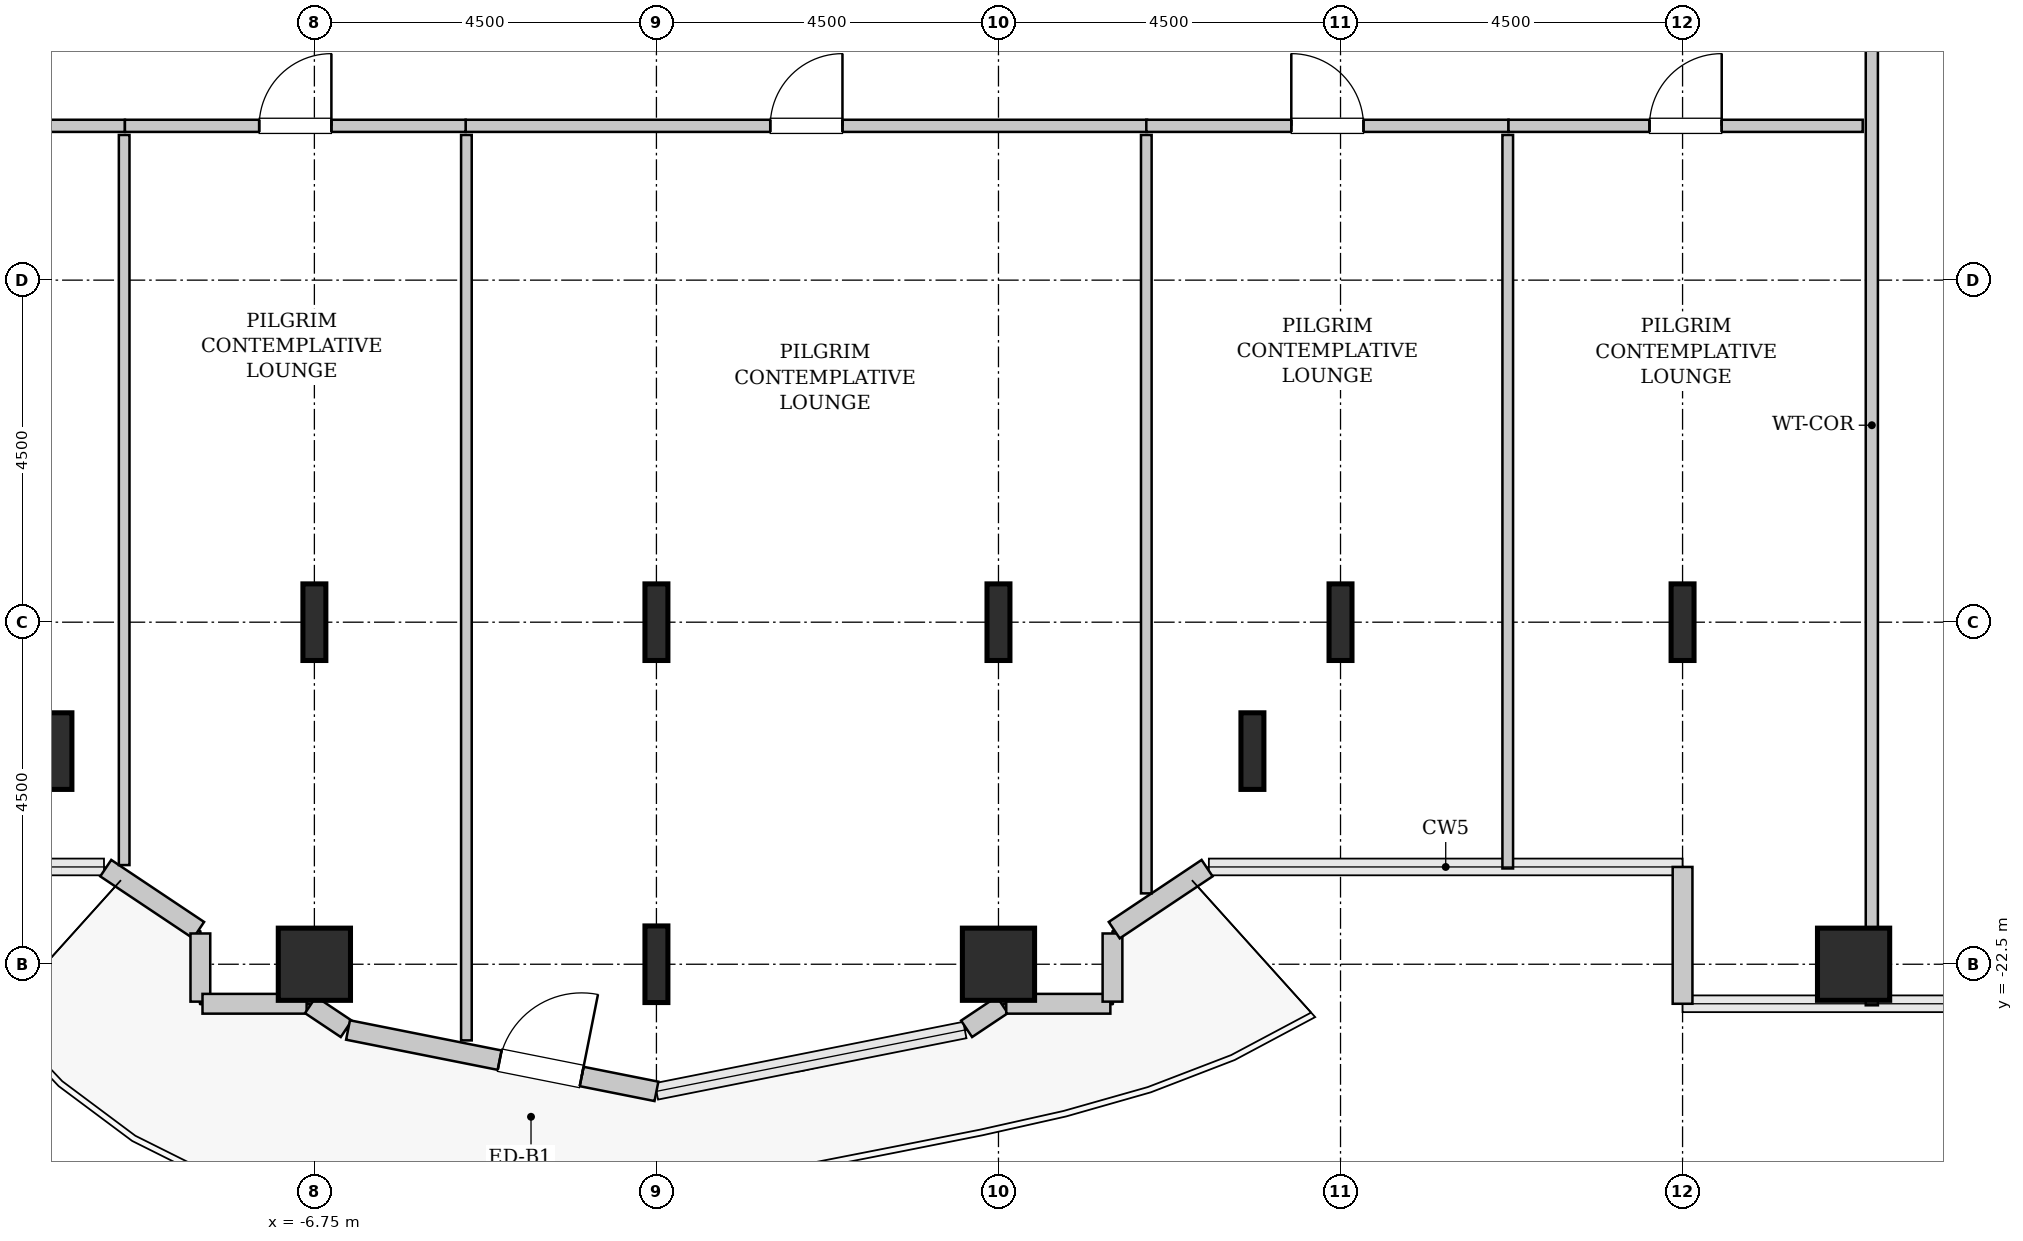
"""IFC4 building model, lengths in metres.
Left out: names, types, materials, properties, quantities, classifications, styles, units other than length and angle.
Written with IfcOpenShell. Run it as: python <this file> out.ifc"""

import sys

from ifc_helpers import new_model, si_unit, direction, frame, frame_2d, origin, origin_2d, place, context, subcontext, project, spatial, rectangle, hollow_rectangle, i_section, extrude, source, transform, mapped, element, fill, save


model = new_model("IFC4")
c1 = context("Model", 3, precision=1e-05, world=origin(), true_north=direction((0.0, 1.0)))
c2 = subcontext(c1, "Body", "Model", "MODEL_VIEW")
j1 = project(units=[si_unit("LENGTHUNIT", "METRE"), si_unit("PLANEANGLEUNIT", "RADIAN")], contexts=[c1])
p1 = place(None, origin())
s1 = spatial("IfcSite", under=j1, at=p1, CompositionType="ELEMENT")
p2 = place(p1, origin())
s2 = spatial("IfcBuilding", under=s1, at=p2, CompositionType="ELEMENT")
p3 = place(p2, frame((0.0, 0.0, 102.2)))
s3 = spatial("IfcBuildingStorey", under=s2, at=p3, CompositionType="ELEMENT", Elevation=102.2)
m1 = source(origin(), c2, "Body", "SweptSolid", [
    extrude(i_section(OverallWidth=0.302, OverallDepth=1.008, WebThickness=0.021, FlangeThickness=0.04, FilletRadius=0.03, at=origin_2d()), origin(), (0.0, 0.0, 1.0), 3.8),
])
p4 = place(p3, frame((-10.091, -19.696, 0.0), z_axis=(0.0, 0.0, 1.0), x_axis=(1.0, 0.0, 0.0)))
e1 = element("IfcColumn", 1, at=p4, inside=s3, PredefinedType="COLUMN", context=c2, shape_type="MappedRepresentation", body=[
    mapped(m1, transform((0.0, 0.0, 0.0), x_axis=(1.0, 0.0, 0.0), y_axis=(0.0, 1.0, 0.0), z_axis=(0.0, 0.0, 1.0), scale=1.0)),
])
m2 = source(origin(), c2, "Body", "SweptSolid", [
    extrude(hollow_rectangle(XDim=0.95, YDim=0.95, WallThickness=0.045, InnerFilletRadius=0.045, OuterFilletRadius=0.09, at=origin_2d()), origin(), (0.0, 0.0, 1.0), 3.8),
])
p5 = place(p3, frame((-6.75, -22.5, 0.0), z_axis=(0.0, 0.0, 1.0), x_axis=(1.0, 0.0, 0.0)))
e2 = element("IfcColumn", 2, at=p5, inside=s3, PredefinedType="COLUMN", context=c2, shape_type="MappedRepresentation", body=[
    mapped(m2, transform((0.0, 0.0, 0.0), x_axis=(1.0, 0.0, 0.0), y_axis=(0.0, 1.0, 0.0), z_axis=(0.0, 0.0, 1.0), scale=1.0)),
])
for number, where, z_axis, x_axis in (
    (3, (-6.75, -18.0, 0.0), (0.0, 0.0, 1.0), (1.0, 0.0, 0.0)),
    (4, (-2.25, -22.5, 0.0), (0.0, 0.0, 1.0), (1.0, 0.0, 0.0)),
    (5, (-2.25, -18.0, 0.0), (0.0, 0.0, 1.0), (1.0, 0.0, 0.0)),
):
    element("IfcColumn", number, at=place(p3, frame(where, z_axis=z_axis, x_axis=x_axis)), inside=s3, PredefinedType="COLUMN", context=c2, shape_type="MappedRepresentation", body=[
        mapped(m1, transform((0.0, 0.0, 0.0), x_axis=(1.0, 0.0, 0.0), y_axis=(0.0, 1.0, 0.0), z_axis=(0.0, 0.0, 1.0), scale=1.0)),
    ])
p6 = place(p3, frame((2.25, -22.5, 0.0), z_axis=(0.0, 0.0, 1.0), x_axis=(1.0, 0.0, 0.0)))
e6 = element("IfcColumn", 6, at=p6, inside=s3, PredefinedType="COLUMN", context=c2, shape_type="MappedRepresentation", body=[
    mapped(m2, transform((0.0, 0.0, 0.0), x_axis=(1.0, 0.0, 0.0), y_axis=(0.0, 1.0, 0.0), z_axis=(0.0, 0.0, 1.0), scale=1.0)),
])
for number, where, z_axis, x_axis in (
    (7, (2.25, -18.0, 0.0), (0.0, 0.0, 1.0), (1.0, 0.0, 0.0)),
    (8, (5.591, -19.696, 0.0), (0.0, 0.0, 1.0), (1.0, 0.0, 0.0)),
    (9, (6.75, -18.0, 0.0), (0.0, 0.0, 1.0), (1.0, 0.0, 0.0)),
    (10, (11.25, -18.0, 0.0), (0.0, 0.0, 1.0), (1.0, 0.0, 0.0)),
):
    element("IfcColumn", number, at=place(p3, frame(where, z_axis=z_axis, x_axis=x_axis)), inside=s3, PredefinedType="COLUMN", context=c2, shape_type="MappedRepresentation", body=[
        mapped(m1, transform((0.0, 0.0, 0.0), x_axis=(1.0, 0.0, 0.0), y_axis=(0.0, 1.0, 0.0), z_axis=(0.0, 0.0, 1.0), scale=1.0)),
    ])
p7 = place(p3, frame((13.5, -22.5, 0.0), z_axis=(0.0, 0.0, 1.0), x_axis=(1.0, 0.0, 0.0)))
e11 = element("IfcColumn", 11, at=p7, inside=s3, PredefinedType="COLUMN", context=c2, shape_type="MappedRepresentation", body=[
    mapped(m2, transform((0.0, 0.0, 0.0), x_axis=(1.0, 0.0, 0.0), y_axis=(0.0, 1.0, 0.0), z_axis=(0.0, 0.0, 1.0), scale=1.0)),
])
m3 = source(origin(), c2, "Body", "SweptSolid", [
    extrude(rectangle(XDim=1.8, YDim=0.26, at=frame_2d((0.9, 0.0))), origin(), (0.0, 0.0, 1.0), 3.55),
])
p8 = place(p3, frame((11.25, -21.22, 0.0), z_axis=(0.0, 0.0, 1.0), x_axis=(0.0, -1.0, 0.0)))
e12 = element("IfcWall", 12, at=p8, inside=s3, PredefinedType="SOLIDWALL", context=c2, shape_type="MappedRepresentation", body=[
    mapped(m3, transform((0.0, 0.0, 0.0), x_axis=(1.0, 0.0, 0.0), y_axis=(0.0, 1.0, 0.0), z_axis=(0.0, 0.0, 1.0), scale=1.0)),
])
m4 = source(origin(), c2, "Body", "SweptSolid", [
    extrude(rectangle(XDim=1.469, YDim=0.26, at=frame_2d((0.734, 0.0))), origin(), (0.0, 0.0, 1.0), 3.55),
])
p9 = place(p3, frame((-9.495, -21.236, 0.0), z_axis=(0.0, 0.0, 1.0), x_axis=(0.831461760506, -0.555581983884, 0.0)))
e13 = element("IfcWall", 13, at=p9, inside=s3, PredefinedType="SOLIDWALL", context=c2, shape_type="MappedRepresentation", body=[
    mapped(m4, transform((0.0, 0.0, 0.0), x_axis=(1.0, 0.0, 0.0), y_axis=(0.0, 1.0, 0.0), z_axis=(0.0, 0.0, 1.0), scale=1.0)),
])
m5 = source(origin(), c2, "Body", "SweptSolid", [
    extrude(rectangle(XDim=0.897, YDim=0.26, at=frame_2d((0.448, 0.0))), origin(), (0.0, 0.0, 1.0), 3.55),
])
p10 = place(p3, frame((-8.25, -22.095, 0.0), z_axis=(0.0, 0.0, 1.0), x_axis=(0.0, -1.0, 0.0)))
e14 = element("IfcWall", 14, at=p10, inside=s3, PredefinedType="SOLIDWALL", context=c2, shape_type="MappedRepresentation", body=[
    mapped(m5, transform((0.0, 0.0, 0.0), x_axis=(1.0, 0.0, 0.0), y_axis=(0.0, 1.0, 0.0), z_axis=(0.0, 0.0, 1.0), scale=1.0)),
])
m6 = source(origin(), c2, "Body", "SweptSolid", [
    extrude(rectangle(XDim=1.37, YDim=0.26, at=frame_2d((0.685, 0.0))), origin(), (0.0, 0.0, 1.0), 3.55),
])
p11 = place(p3, frame((-8.222, -23.02, 0.0), z_axis=(0.0, 0.0, 1.0), x_axis=(1.0, 0.0, 0.0)))
e15 = element("IfcWall", 15, at=p11, inside=s3, PredefinedType="SOLIDWALL", context=c2, shape_type="MappedRepresentation", body=[
    mapped(m6, transform((0.0, 0.0, 0.0), x_axis=(1.0, 0.0, 0.0), y_axis=(0.0, 1.0, 0.0), z_axis=(0.0, 0.0, 1.0), scale=1.0)),
])
m7 = source(origin(), c2, "Body", "SweptSolid", [
    extrude(rectangle(XDim=0.565, YDim=0.26, at=frame_2d((0.283, 0.0))), origin(), (0.0, 0.0, 1.0), 3.55),
])
p12 = place(p3, frame((-6.801, -23.036, 0.0), z_axis=(0.0, 0.0, 1.0), x_axis=(0.831651492666, -0.555297933317, 0.0)))
e16 = element("IfcWall", 16, at=p12, inside=s3, PredefinedType="SOLIDWALL", context=c2, shape_type="MappedRepresentation", body=[
    mapped(m7, transform((0.0, 0.0, 0.0), x_axis=(1.0, 0.0, 0.0), y_axis=(0.0, 1.0, 0.0), z_axis=(0.0, 0.0, 1.0), scale=1.0)),
])
m8 = source(origin(), c2, "Body", "SweptSolid", [
    extrude(rectangle(XDim=4.137, YDim=0.26, at=frame_2d((2.068, 0.0))), origin(), (0.0, 0.0, 1.0), 3.55),
])
p13 = place(p3, frame((-6.307, -23.365, 0.0), z_axis=(0.0, 0.0, 1.0), x_axis=(0.980782170794, -0.195105954428, 0.0)))
e17 = element("IfcWall", 17, at=p13, inside=s3, PredefinedType="SOLIDWALL", context=c2, shape_type="MappedRepresentation", body=[
    mapped(m8, transform((0.0, 0.0, 0.0), x_axis=(1.0, 0.0, 0.0), y_axis=(0.0, 1.0, 0.0), z_axis=(0.0, 0.0, 1.0), scale=1.0)),
])
p14 = place(p13, frame((2.034, 0.0, 0.0)))
e18 = element("IfcOpeningElement", 18, at=p14, cuts=e17, PredefinedType="OPENING", context=c2, shape_type="SweptSolid", body=[
    extrude(rectangle(XDim=1.1, YDim=2.2, at=frame_2d((0.55, 1.1))), frame((0.0, 0.14, 0.0), z_axis=(0.0, -1.0, 0.0), x_axis=(1.0, 0.0, 0.0)), (0.0, 0.0, 1.0), 0.28),
])
p15 = place(p3, frame((1.831, -23.35, 0.0), z_axis=(0.0, 0.0, 1.0), x_axis=(0.831651492666, 0.555297933317, 0.0)))
e19 = element("IfcWall", 19, at=p15, inside=s3, PredefinedType="SOLIDWALL", context=c2, shape_type="MappedRepresentation", body=[
    mapped(m7, transform((0.0, 0.0, 0.0), x_axis=(1.0, 0.0, 0.0), y_axis=(0.0, 1.0, 0.0), z_axis=(0.0, 0.0, 1.0), scale=1.0)),
])
p16 = place(p3, frame((2.352, -23.02, 0.0), z_axis=(0.0, 0.0, 1.0), x_axis=(1.0, 0.0, 0.0)))
e20 = element("IfcWall", 20, at=p16, inside=s3, PredefinedType="SOLIDWALL", context=c2, shape_type="MappedRepresentation", body=[
    mapped(m6, transform((0.0, 0.0, 0.0), x_axis=(1.0, 0.0, 0.0), y_axis=(0.0, 1.0, 0.0), z_axis=(0.0, 0.0, 1.0), scale=1.0)),
])
p17 = place(p3, frame((3.75, -22.992, 0.0), z_axis=(0.0, 0.0, 1.0), x_axis=(0.0, 1.0, 0.0)))
e21 = element("IfcWall", 21, at=p17, inside=s3, PredefinedType="SOLIDWALL", context=c2, shape_type="MappedRepresentation", body=[
    mapped(m5, transform((0.0, 0.0, 0.0), x_axis=(1.0, 0.0, 0.0), y_axis=(0.0, 1.0, 0.0), z_axis=(0.0, 0.0, 1.0), scale=1.0)),
])
p18 = place(p3, frame((3.773, -22.052, 0.0), z_axis=(0.0, 0.0, 1.0), x_axis=(0.831461760506, 0.555581983884, 0.0)))
e22 = element("IfcWall", 22, at=p18, inside=s3, PredefinedType="SOLIDWALL", context=c2, shape_type="MappedRepresentation", body=[
    mapped(m4, transform((0.0, 0.0, 0.0), x_axis=(1.0, 0.0, 0.0), y_axis=(0.0, 1.0, 0.0), z_axis=(0.0, 0.0, 1.0), scale=1.0)),
])
m9 = source(origin(), c2, "Body", "SweptSolid", [
    extrude(rectangle(XDim=19.845, YDim=0.16, at=frame_2d((9.922, 0.0))), origin(), (0.0, 0.0, 1.0), 3.535),
])
p19 = place(p3, frame((13.74, -23.04, 0.0), z_axis=(0.0, 0.0, 1.0), x_axis=(0.0, 1.0, 0.0)))
e23 = element("IfcWall", 23, at=p19, inside=s3, PredefinedType="PARTITIONING", context=c2, shape_type="MappedRepresentation", body=[
    mapped(m9, transform((0.0, 0.0, 0.0), x_axis=(1.0, 0.0, 0.0), y_axis=(0.0, 1.0, 0.0), z_axis=(0.0, 0.0, 1.0), scale=1.0)),
])
p20 = place(p19, frame((15.212, 0.0, 0.0)))
e24 = element("IfcOpeningElement", 24, at=p20, cuts=e23, PredefinedType="OPENING", context=c2, shape_type="SweptSolid", body=[
    extrude(rectangle(XDim=0.95, YDim=2.1, at=frame_2d((0.475, 1.05))), frame((0.0, 0.09, 0.0), z_axis=(0.0, -1.0, 0.0), x_axis=(1.0, 0.0, 0.0)), (0.0, 0.0, 1.0), 0.18),
])
m10 = source(origin(), c2, "Body", "SweptSolid", [
    extrude(rectangle(XDim=8.965, YDim=0.16, at=frame_2d((4.482, 0.0))), origin(), (0.0, 0.0, 1.0), 3.535),
])
p21 = place(p3, frame((-4.76, -11.47, 0.0), z_axis=(0.0, 0.0, 1.0), x_axis=(1.0, 0.0, 0.0)))
e25 = element("IfcWall", 25, at=p21, inside=s3, PredefinedType="PARTITIONING", context=c2, shape_type="MappedRepresentation", body=[
    mapped(m10, transform((0.0, 0.0, 0.0), x_axis=(1.0, 0.0, 0.0), y_axis=(0.0, 1.0, 0.0), z_axis=(0.0, 0.0, 1.0), scale=1.0)),
])
p22 = place(p21, frame((4.008, 0.0, 0.0)))
e26 = element("IfcOpeningElement", 26, at=p22, cuts=e25, PredefinedType="OPENING", context=c2, shape_type="SweptSolid", body=[
    extrude(rectangle(XDim=0.95, YDim=2.1, at=frame_2d((0.475, 1.05))), frame((0.0, 0.09, 0.0), z_axis=(0.0, -1.0, 0.0), x_axis=(1.0, 0.0, 0.0)), (0.0, 0.0, 1.0), 0.18),
])
m11 = source(origin(), c2, "Body", "SweptSolid", [
    extrude(rectangle(XDim=11.912, YDim=0.14, at=frame_2d((5.956, 0.0))), origin(), (0.0, 0.0, 1.0), 3.535),
])
p23 = place(p3, frame((-4.75, -23.502, 0.0), z_axis=(0.0, 0.0, 1.0), x_axis=(0.0, 1.0, 0.0)))
e27 = element("IfcWall", 27, at=p23, inside=s3, PredefinedType="PARTITIONING", context=c2, shape_type="MappedRepresentation", body=[
    mapped(m11, transform((0.0, 0.0, 0.0), x_axis=(1.0, 0.0, 0.0), y_axis=(0.0, 1.0, 0.0), z_axis=(0.0, 0.0, 1.0), scale=1.0)),
])
m12 = source(origin(), c2, "Body", "SweptSolid", [
    extrude(rectangle(XDim=9.978, YDim=0.14, at=frame_2d((4.989, 0.0))), origin(), (0.0, 0.0, 1.0), 3.535),
])
p24 = place(p3, frame((4.195, -21.568, 0.0), z_axis=(0.0, 0.0, 1.0), x_axis=(0.0, 1.0, 0.0)))
e28 = element("IfcWall", 28, at=p24, inside=s3, PredefinedType="PARTITIONING", context=c2, shape_type="MappedRepresentation", body=[
    mapped(m12, transform((0.0, 0.0, 0.0), x_axis=(1.0, 0.0, 0.0), y_axis=(0.0, 1.0, 0.0), z_axis=(0.0, 0.0, 1.0), scale=1.0)),
])
m13 = source(origin(), c2, "Body", "SweptSolid", [
    extrude(rectangle(XDim=4.378, YDim=0.16, at=frame_2d((2.189, 0.0))), origin(), (0.0, 0.0, 1.0), 3.535),
])
p25 = place(p3, frame((-13.62, -11.47, 0.0), z_axis=(0.0, 0.0, 1.0), x_axis=(1.0, 0.0, 0.0)))
e29 = element("IfcWall", 29, at=p25, inside=s3, PredefinedType="PARTITIONING", context=c2, shape_type="MappedRepresentation", body=[
    mapped(m13, transform((0.0, 0.0, 0.0), x_axis=(1.0, 0.0, 0.0), y_axis=(0.0, 1.0, 0.0), z_axis=(0.0, 0.0, 1.0), scale=1.0)),
])
p26 = place(p25, frame((1.714, 0.0, 0.0)))
e30 = element("IfcOpeningElement", 30, at=p26, cuts=e29, PredefinedType="OPENING", context=c2, shape_type="SweptSolid", body=[
    extrude(rectangle(XDim=0.95, YDim=2.1, at=frame_2d((0.475, 1.05))), frame((0.0, 0.09, 0.0), z_axis=(0.0, -1.0, 0.0), x_axis=(1.0, 0.0, 0.0)), (0.0, 0.0, 1.0), 0.18),
])
m14 = source(origin(), c2, "Body", "SweptSolid", [
    extrude(rectangle(XDim=9.605, YDim=0.14, at=frame_2d((4.803, 0.0))), origin(), (0.0, 0.0, 1.0), 3.535),
])
p27 = place(p3, frame((-9.252, -21.195, 0.0), z_axis=(0.0, 0.0, 1.0), x_axis=(0.0, 1.0, 0.0)))
e31 = element("IfcWall", 31, at=p27, inside=s3, PredefinedType="PARTITIONING", context=c2, shape_type="MappedRepresentation", body=[
    mapped(m14, transform((0.0, 0.0, 0.0), x_axis=(1.0, 0.0, 0.0), y_axis=(0.0, 1.0, 0.0), z_axis=(0.0, 0.0, 1.0), scale=1.0)),
])
m15 = source(origin(), c2, "Body", "SweptSolid", [
    extrude(rectangle(XDim=4.482, YDim=0.16, at=frame_2d((2.241, 0.0))), origin(), (0.0, 0.0, 1.0), 3.535),
])
p28 = place(p3, frame((-9.242, -11.47, 0.0), z_axis=(0.0, 0.0, 1.0), x_axis=(1.0, 0.0, 0.0)))
e32 = element("IfcWall", 32, at=p28, inside=s3, PredefinedType="PARTITIONING", context=c2, shape_type="MappedRepresentation", body=[
    mapped(m15, transform((0.0, 0.0, 0.0), x_axis=(1.0, 0.0, 0.0), y_axis=(0.0, 1.0, 0.0), z_axis=(0.0, 0.0, 1.0), scale=1.0)),
])
p29 = place(p28, frame((1.766, 0.0, 0.0)))
e33 = element("IfcOpeningElement", 33, at=p29, cuts=e32, PredefinedType="OPENING", context=c2, shape_type="SweptSolid", body=[
    extrude(rectangle(XDim=0.95, YDim=2.1, at=frame_2d((0.475, 1.05))), frame((0.0, 0.09, 0.0), z_axis=(0.0, -1.0, 0.0), x_axis=(1.0, 0.0, 0.0)), (0.0, 0.0, 1.0), 0.18),
])
m16 = source(origin(), c2, "Body", "SweptSolid", [
    extrude(rectangle(XDim=4.765, YDim=0.16, at=frame_2d((2.382, 0.0))), origin(), (0.0, 0.0, 1.0), 3.535),
])
p30 = place(p3, frame((4.195, -11.47, 0.0), z_axis=(0.0, 0.0, 1.0), x_axis=(1.0, 0.0, 0.0)))
e34 = element("IfcWall", 34, at=p30, inside=s3, PredefinedType="PARTITIONING", context=c2, shape_type="MappedRepresentation", body=[
    mapped(m16, transform((0.0, 0.0, 0.0), x_axis=(1.0, 0.0, 0.0), y_axis=(0.0, 1.0, 0.0), z_axis=(0.0, 0.0, 1.0), scale=1.0)),
])
p31 = place(p30, frame((1.907, 0.0, 0.0)))
e35 = element("IfcOpeningElement", 35, at=p31, cuts=e34, PredefinedType="OPENING", context=c2, shape_type="SweptSolid", body=[
    extrude(rectangle(XDim=0.95, YDim=2.1, at=frame_2d((0.475, 1.05))), frame((0.0, 0.09, 0.0), z_axis=(0.0, -1.0, 0.0), x_axis=(1.0, 0.0, 0.0)), (0.0, 0.0, 1.0), 0.18),
])
m17 = source(origin(), c2, "Body", "SweptSolid", [
    extrude(rectangle(XDim=9.65, YDim=0.14, at=frame_2d((4.825, 0.0))), origin(), (0.0, 0.0, 1.0), 3.535),
])
p32 = place(p3, frame((8.95, -21.24, 0.0), z_axis=(0.0, 0.0, 1.0), x_axis=(0.0, 1.0, 0.0)))
e36 = element("IfcWall", 36, at=p32, inside=s3, PredefinedType="PARTITIONING", context=c2, shape_type="MappedRepresentation", body=[
    mapped(m17, transform((0.0, 0.0, 0.0), x_axis=(1.0, 0.0, 0.0), y_axis=(0.0, 1.0, 0.0), z_axis=(0.0, 0.0, 1.0), scale=1.0)),
])
m18 = source(origin(), c2, "Body", "SweptSolid", [
    extrude(rectangle(XDim=4.66, YDim=0.16, at=frame_2d((2.33, 0.0))), origin(), (0.0, 0.0, 1.0), 3.535),
])
p33 = place(p3, frame((8.96, -11.47, 0.0), z_axis=(0.0, 0.0, 1.0), x_axis=(1.0, 0.0, 0.0)))
e37 = element("IfcWall", 37, at=p33, inside=s3, PredefinedType="PARTITIONING", context=c2, shape_type="MappedRepresentation", body=[
    mapped(m18, transform((0.0, 0.0, 0.0), x_axis=(1.0, 0.0, 0.0), y_axis=(0.0, 1.0, 0.0), z_axis=(0.0, 0.0, 1.0), scale=1.0)),
])
p34 = place(p33, frame((1.855, 0.0, 0.0)))
e38 = element("IfcOpeningElement", 38, at=p34, cuts=e37, PredefinedType="OPENING", context=c2, shape_type="SweptSolid", body=[
    extrude(rectangle(XDim=0.95, YDim=2.1, at=frame_2d((0.475, 1.05))), frame((0.0, 0.09, 0.0), z_axis=(0.0, -1.0, 0.0), x_axis=(1.0, 0.0, 0.0)), (0.0, 0.0, 1.0), 0.18),
])
m19 = source(origin(), c2, "Body", "SweptSolid", [
    extrude(rectangle(XDim=1.1, YDim=2.2, at=frame_2d((0.55, 1.1))), frame((0.0, 0.025, 0.0), z_axis=(0.0, -1.0, 0.0), x_axis=(1.0, 0.0, 0.0)), (0.0, 0.0, 1.0), 0.05),
])
p35 = place(p14, origin())
e39 = element("IfcDoor", 39, at=p35, inside=s3, OperationType="SINGLE_SWING_RIGHT", PredefinedType="DOOR", context=c2, shape_type="MappedRepresentation", body=[
    mapped(m19, transform((0.0, 0.0, 0.0), x_axis=(1.0, 0.0, 0.0), y_axis=(0.0, 1.0, 0.0), z_axis=(0.0, 0.0, 1.0), scale=1.0)),
])
fill(e18, e39)
m20 = source(origin(), c2, "Body", "SweptSolid", [
    extrude(rectangle(XDim=0.95, YDim=2.1, at=frame_2d((0.475, 1.05))), frame((0.0, 0.025, 0.0), z_axis=(0.0, -1.0, 0.0), x_axis=(1.0, 0.0, 0.0)), (0.0, 0.0, 1.0), 0.05),
])
p36 = place(p22, origin())
e40 = element("IfcDoor", 40, at=p36, inside=s3, OperationType="SINGLE_SWING_RIGHT", PredefinedType="DOOR", context=c2, shape_type="MappedRepresentation", body=[
    mapped(m20, transform((0.0, 0.0, 0.0), x_axis=(1.0, 0.0, 0.0), y_axis=(0.0, 1.0, 0.0), z_axis=(0.0, 0.0, 1.0), scale=1.0)),
])
fill(e26, e40)
p37 = place(p29, origin())
e41 = element("IfcDoor", 41, at=p37, inside=s3, OperationType="SINGLE_SWING_RIGHT", PredefinedType="DOOR", context=c2, shape_type="MappedRepresentation", body=[
    mapped(m20, transform((0.0, 0.0, 0.0), x_axis=(1.0, 0.0, 0.0), y_axis=(0.0, 1.0, 0.0), z_axis=(0.0, 0.0, 1.0), scale=1.0)),
])
fill(e33, e41)
p38 = place(p31, origin())
e42 = element("IfcDoor", 42, at=p38, inside=s3, OperationType="SINGLE_SWING_LEFT", PredefinedType="DOOR", context=c2, shape_type="MappedRepresentation", body=[
    mapped(m20, transform((0.0, 0.0, 0.0), x_axis=(1.0, 0.0, 0.0), y_axis=(0.0, 1.0, 0.0), z_axis=(0.0, 0.0, 1.0), scale=1.0)),
])
fill(e35, e42)
p39 = place(p34, origin())
e43 = element("IfcDoor", 43, at=p39, inside=s3, OperationType="SINGLE_SWING_RIGHT", PredefinedType="DOOR", context=c2, shape_type="MappedRepresentation", body=[
    mapped(m20, transform((0.0, 0.0, 0.0), x_axis=(1.0, 0.0, 0.0), y_axis=(0.0, 1.0, 0.0), z_axis=(0.0, 0.0, 1.0), scale=1.0)),
])
fill(e38, e43)
save(model, sys.argv[1])
